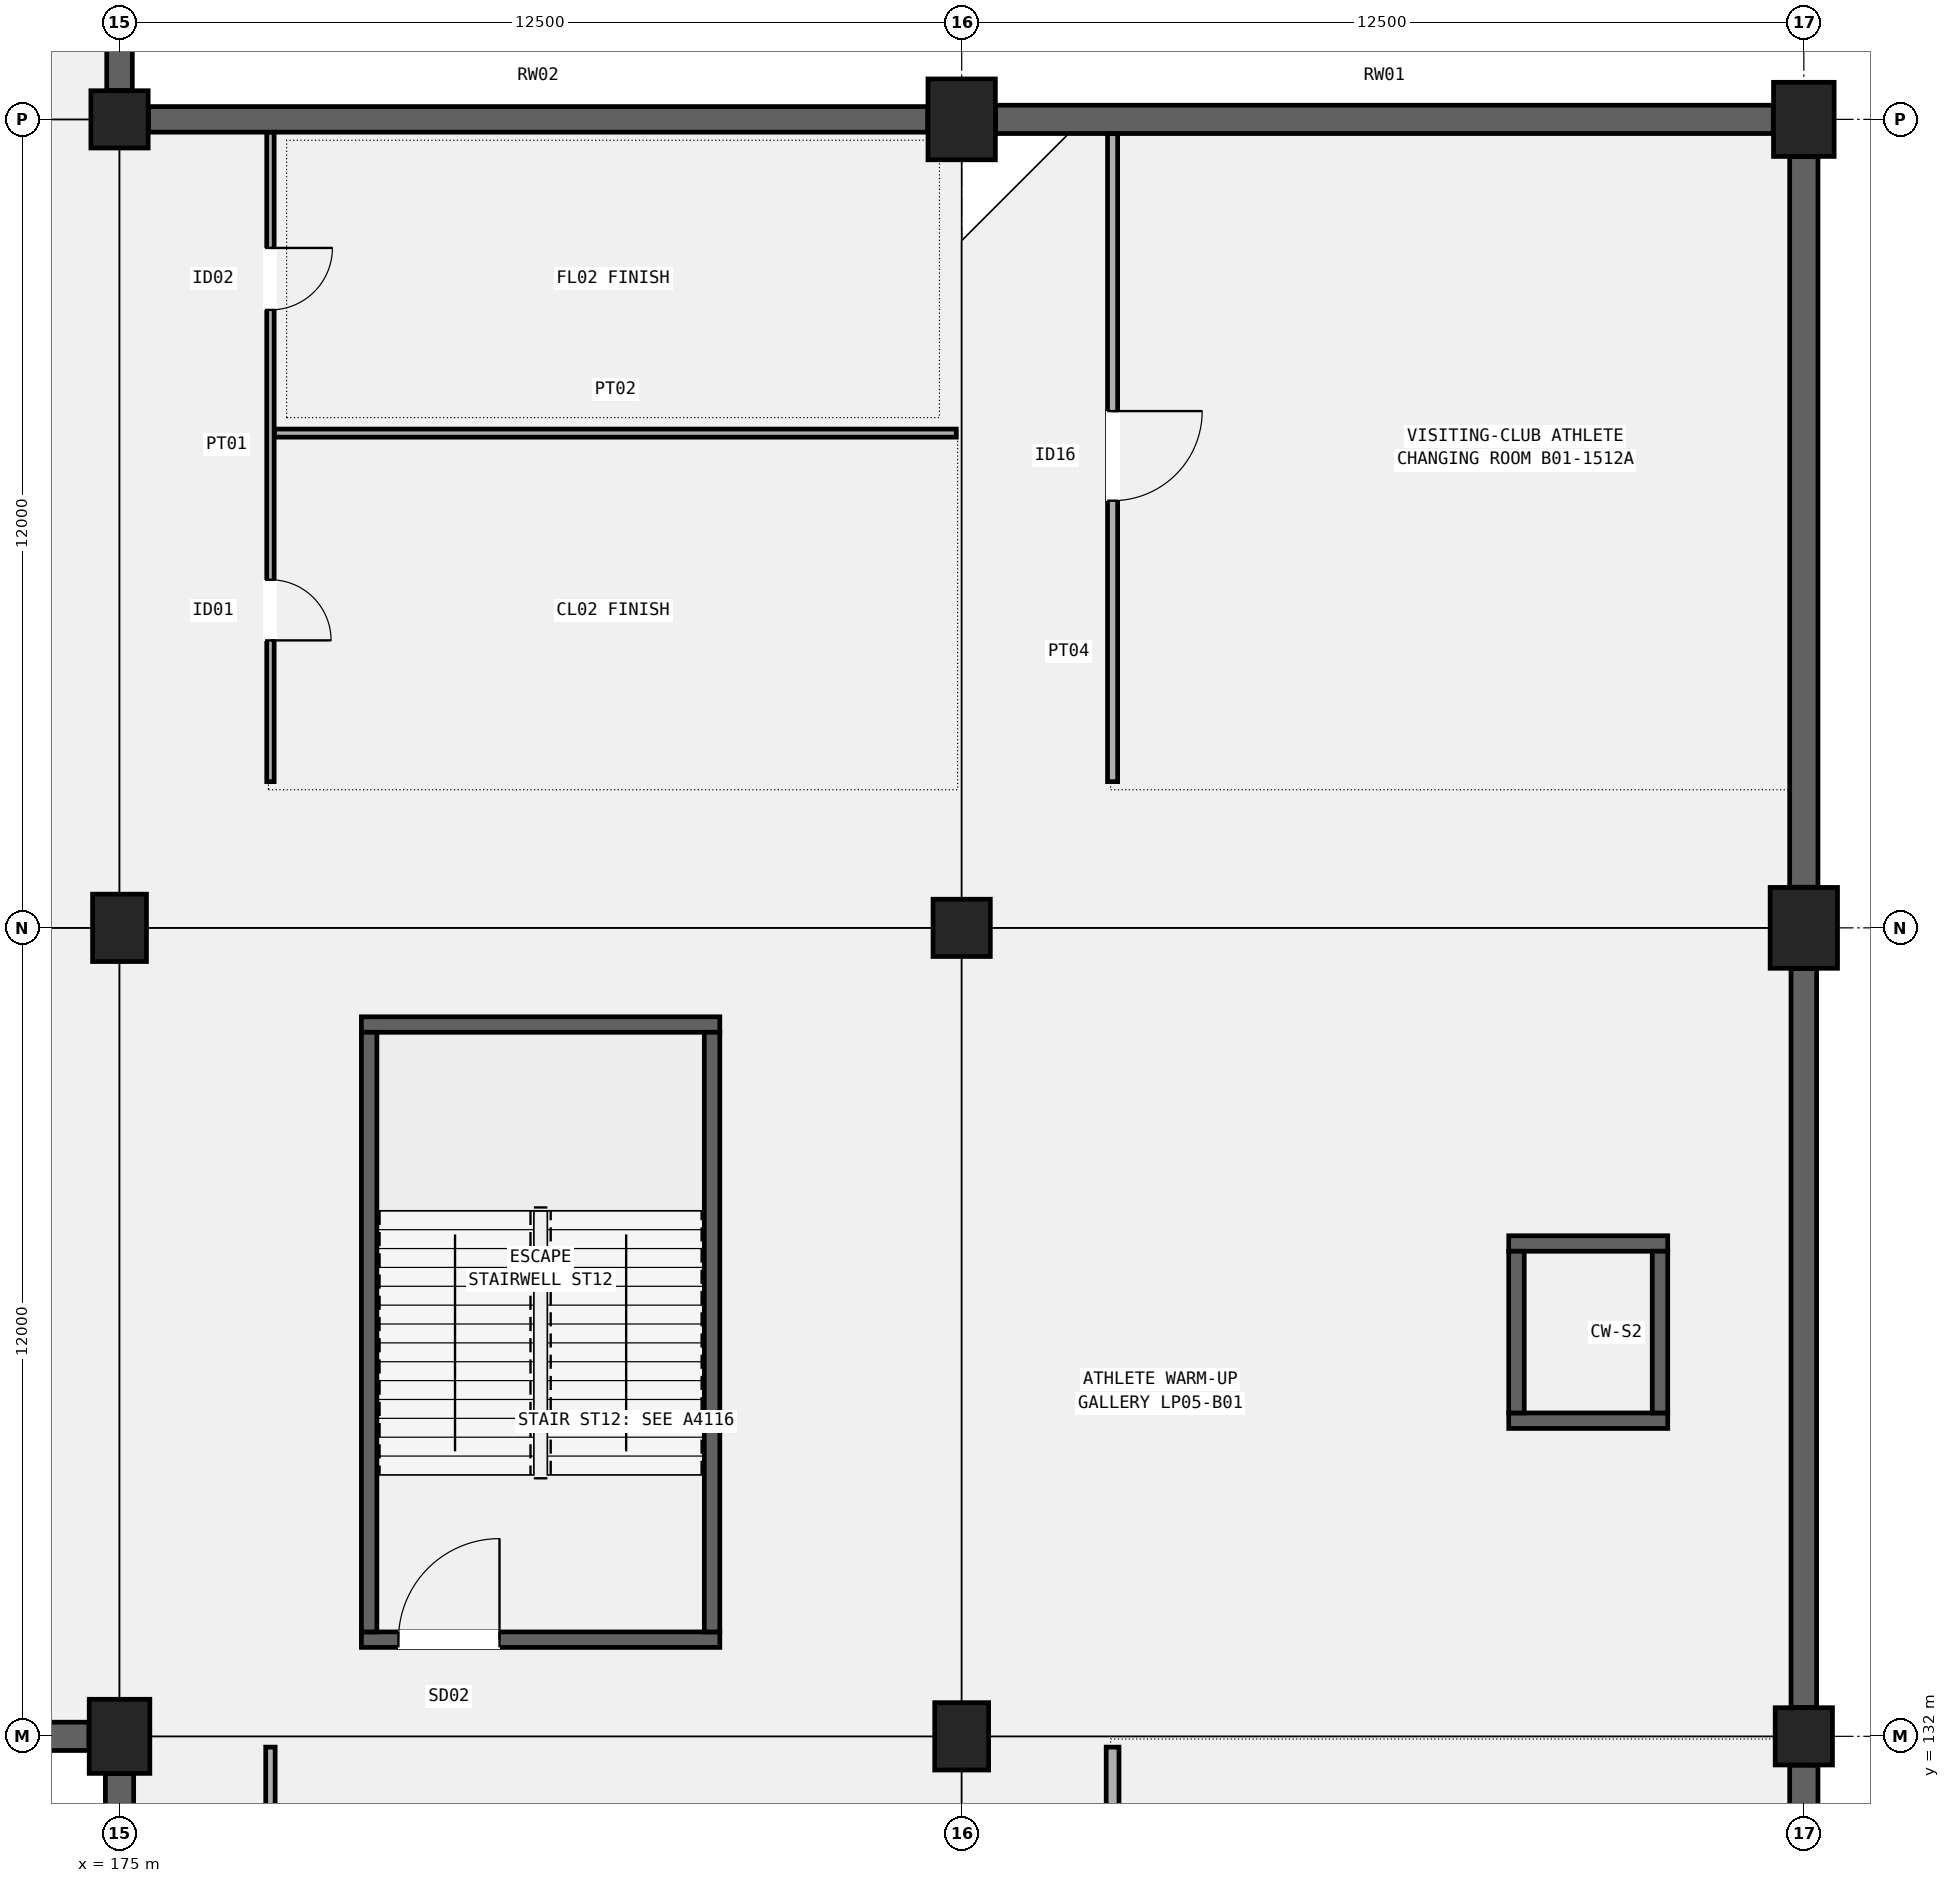
"""IFC4 building model, lengths in metres.
Left out: names, types, materials, properties, quantities, classifications, styles, units other than length and angle.
Written with IfcOpenShell. Run it as: python <this file> out.ifc"""

import sys

from ifc_helpers import new_model, si_unit, direction, frame, frame_2d, origin, origin_2d, place, context, subcontext, project, spatial, rectangle, circle, extrude, element, fill, save


model = new_model("IFC4")
c1 = context("Model", 3, precision=1e-05, world=origin(), true_north=direction((0.0, 1.0)))
c2 = subcontext(c1, "Body", "Model", "MODEL_VIEW")
j1 = project(units=[si_unit("LENGTHUNIT", "METRE"), si_unit("PLANEANGLEUNIT", "RADIAN")], contexts=[c1])
p1 = place(None, origin())
s1 = spatial("IfcSite", under=j1, at=p1, CompositionType="ELEMENT")
p2 = place(p1, origin())
s2 = spatial("IfcBuilding", under=s1, at=p2, CompositionType="ELEMENT")
p3 = place(p2, frame((0.0, 0.0, -4.8)))
s3 = spatial("IfcBuildingStorey", under=s2, at=p3, CompositionType="ELEMENT", Elevation=-4.8)
p4 = place(p3, frame((175.0, 132.0, 0.0), z_axis=(0.0, 0.0, 1.0), x_axis=(1.0, 0.0, 0.0)))
e1 = element("IfcColumn", 1, at=p4, inside=s3, PredefinedType="COLUMN", context=c2, shape_type="SweptSolid", body=[
    extrude(rectangle(XDim=0.9, YDim=1.1, at=origin_2d()), origin(), (0.0, 0.0, 1.0), 4.8),
])
p5 = place(p3, frame((175.0, 144.0, 0.0), z_axis=(0.0, 0.0, 1.0), x_axis=(1.0, 0.0, 0.0)))
e2 = element("IfcColumn", 2, at=p5, inside=s3, PredefinedType="COLUMN", context=c2, shape_type="SweptSolid", body=[
    extrude(rectangle(XDim=0.8, YDim=1.0, at=origin_2d()), origin(), (0.0, 0.0, 1.0), 4.8),
])
p6 = place(p3, frame((175.0, 156.0, 0.0), z_axis=(0.0, 0.0, 1.0), x_axis=(1.0, 0.0, 0.0)))
e3 = element("IfcColumn", 3, at=p6, inside=s3, PredefinedType="COLUMN", context=c2, shape_type="SweptSolid", body=[
    extrude(circle(Radius=0.425, at=origin_2d()), origin(), (0.0, 0.0, 1.0), 4.8),
])
p7 = place(p3, frame((187.5, 132.0, 0.0), z_axis=(0.0, 0.0, 1.0), x_axis=(1.0, 0.0, 0.0)))
e4 = element("IfcColumn", 4, at=p7, inside=s3, PredefinedType="COLUMN", context=c2, shape_type="SweptSolid", body=[
    extrude(rectangle(XDim=0.8, YDim=1.0, at=origin_2d()), origin(), (0.0, 0.0, 1.0), 4.8),
])
p8 = place(p3, frame((187.5, 144.0, 0.0), z_axis=(0.0, 0.0, 1.0), x_axis=(1.0, 0.0, 0.0)))
e5 = element("IfcColumn", 5, at=p8, inside=s3, PredefinedType="COLUMN", context=c2, shape_type="SweptSolid", body=[
    extrude(circle(Radius=0.425, at=origin_2d()), origin(), (0.0, 0.0, 1.0), 4.8),
])
p9 = place(p3, frame((187.5, 156.0, 0.0), z_axis=(0.0, 0.0, 1.0), x_axis=(1.0, 0.0, 0.0)))
e6 = element("IfcColumn", 6, at=p9, inside=s3, PredefinedType="COLUMN", context=c2, shape_type="SweptSolid", body=[
    extrude(rectangle(XDim=1.0, YDim=1.2, at=origin_2d()), origin(), (0.0, 0.0, 1.0), 4.8),
])
p10 = place(p3, frame((200.0, 132.0, 0.0), z_axis=(0.0, 0.0, 1.0), x_axis=(1.0, 0.0, 0.0)))
e7 = element("IfcColumn", 7, at=p10, inside=s3, PredefinedType="COLUMN", context=c2, shape_type="SweptSolid", body=[
    extrude(circle(Radius=0.425, at=origin_2d()), origin(), (0.0, 0.0, 1.0), 4.8),
])
p11 = place(p3, frame((200.0, 144.0, 0.0), z_axis=(0.0, 0.0, 1.0), x_axis=(1.0, 0.0, 0.0)))
e8 = element("IfcColumn", 8, at=p11, inside=s3, PredefinedType="COLUMN", context=c2, shape_type="SweptSolid", body=[
    extrude(rectangle(XDim=1.0, YDim=1.2, at=origin_2d()), origin(), (0.0, 0.0, 1.0), 4.8),
])
p12 = place(p3, frame((200.0, 156.0, 0.0), z_axis=(0.0, 0.0, 1.0), x_axis=(1.0, 0.0, 0.0)))
e9 = element("IfcColumn", 9, at=p12, inside=s3, PredefinedType="COLUMN", context=c2, shape_type="SweptSolid", body=[
    extrude(rectangle(XDim=0.9, YDim=1.1, at=origin_2d()), origin(), (0.0, 0.0, 1.0), 4.8),
])
p13 = place(p3, frame((163.004, 132.0, 0.0), z_axis=(0.0, 0.0, 1.0), x_axis=(1.0, 0.0, 0.0)))
e10 = element("IfcWall", 10, at=p13, inside=s3, PredefinedType="STANDARD", context=c2, shape_type="SweptSolid", body=[
    extrude(rectangle(XDim=11.542, YDim=0.42, at=frame_2d((5.771, 0.0))), origin(), (0.0, 0.0, 1.0), 4.46),
])
p14 = place(p3, frame((175.0, 156.429, 0.0), z_axis=(0.0, 0.0, 1.0), x_axis=(0.0, 1.0, 0.0)))
e11 = element("IfcWall", 11, at=p14, inside=s3, PredefinedType="STANDARD", context=c2, shape_type="SweptSolid", body=[
    extrude(rectangle(XDim=10.967, YDim=0.38, at=frame_2d((5.483, 0.0))), origin(), (0.0, 0.0, 1.0), 4.46),
])
p15 = place(p3, frame((175.0, 120.604, 0.0), z_axis=(0.0, 0.0, 1.0), x_axis=(0.0, 1.0, 0.0)))
e12 = element("IfcWall", 12, at=p15, inside=s3, PredefinedType="STANDARD", context=c2, shape_type="SweptSolid", body=[
    extrude(rectangle(XDim=10.842, YDim=0.42, at=frame_2d((5.421, 0.0))), origin(), (0.0, 0.0, 1.0), 4.46),
])
p16 = place(p3, frame((175.429, 156.0, 0.0), z_axis=(0.0, 0.0, 1.0), x_axis=(1.0, 0.0, 0.0)))
e13 = element("IfcWall", 13, at=p16, inside=s3, PredefinedType="STANDARD", context=c2, shape_type="SweptSolid", body=[
    extrude(rectangle(XDim=11.567, YDim=0.38, at=frame_2d((5.784, 0.0))), origin(), (0.0, 0.0, 1.0), 4.46),
])
p17 = place(p3, frame((200.0, 120.504, 0.0), z_axis=(0.0, 0.0, 1.0), x_axis=(0.0, 1.0, 0.0)))
e14 = element("IfcWall", 14, at=p17, inside=s3, PredefinedType="STANDARD", context=c2, shape_type="SweptSolid", body=[
    extrude(rectangle(XDim=11.067, YDim=0.42, at=frame_2d((5.534, 0.0))), origin(), (0.0, 0.0, 1.0), 4.46),
])
p18 = place(p3, frame((200.0, 132.429, 0.0), z_axis=(0.0, 0.0, 1.0), x_axis=(0.0, 1.0, 0.0)))
e15 = element("IfcWall", 15, at=p18, inside=s3, PredefinedType="STANDARD", context=c2, shape_type="SweptSolid", body=[
    extrude(rectangle(XDim=10.967, YDim=0.38, at=frame_2d((5.483, 0.0))), origin(), (0.0, 0.0, 1.0), 4.46),
])
p19 = place(p3, frame((188.004, 156.0, 0.0), z_axis=(0.0, 0.0, 1.0), x_axis=(1.0, 0.0, 0.0)))
e16 = element("IfcWall", 16, at=p19, inside=s3, PredefinedType="STANDARD", context=c2, shape_type="SweptSolid", body=[
    extrude(rectangle(XDim=11.542, YDim=0.42, at=frame_2d((5.771, 0.0))), origin(), (0.0, 0.0, 1.0), 4.46),
])
p20 = place(p3, frame((200.0, 144.604, 0.0), z_axis=(0.0, 0.0, 1.0), x_axis=(0.0, 1.0, 0.0)))
e17 = element("IfcWall", 17, at=p20, inside=s3, PredefinedType="STANDARD", context=c2, shape_type="SweptSolid", body=[
    extrude(rectangle(XDim=10.842, YDim=0.42, at=frame_2d((5.421, 0.0))), origin(), (0.0, 0.0, 1.0), 4.46),
])
p21 = place(p3, frame((178.59, 133.435, 0.0), z_axis=(0.0, 0.0, 1.0), x_axis=(1.0, 0.0, 0.0)))
e18 = element("IfcWall", 18, at=p21, inside=s3, PredefinedType="SHEAR", context=c2, shape_type="SweptSolid", body=[
    extrude(rectangle(XDim=5.32, YDim=0.23, at=frame_2d((2.66, 0.0))), origin(), (0.0, 0.0, 1.0), 4.5),
])
p22 = place(p21, frame((0.55, 0.0, 0.0)))
e19 = element("IfcOpeningElement", 19, at=p22, cuts=e18, PredefinedType="OPENING", context=c2, shape_type="SweptSolid", body=[
    extrude(rectangle(XDim=1.5, YDim=2.2, at=frame_2d((0.75, 1.1))), frame((0.0, 0.125, 0.0), z_axis=(0.0, -1.0, 0.0), x_axis=(1.0, 0.0, 0.0)), (0.0, 0.0, 1.0), 0.25),
])
p23 = place(p3, frame((178.59, 142.565, 0.0), z_axis=(0.0, 0.0, 1.0), x_axis=(1.0, 0.0, 0.0)))
e20 = element("IfcWall", 20, at=p23, inside=s3, PredefinedType="SHEAR", context=c2, shape_type="SweptSolid", body=[
    extrude(rectangle(XDim=5.32, YDim=0.23, at=frame_2d((2.66, 0.0))), origin(), (0.0, 0.0, 1.0), 4.5),
])
for number, where, z_axis, x_axis in (
    (21, (178.705, 133.55, 0.0), (0.0, 0.0, 1.0), (0.0, 1.0, 0.0)),
    (22, (183.795, 133.55, 0.0), (0.0, 0.0, 1.0), (0.0, 1.0, 0.0)),
):
    element("IfcWall", number, at=place(p3, frame(where, z_axis=z_axis, x_axis=x_axis)), inside=s3, PredefinedType="SHEAR", context=c2, shape_type="SweptSolid", body=[
        extrude(rectangle(XDim=8.9, YDim=0.23, at=frame_2d((4.45, 0.0))), origin(), (0.0, 0.0, 1.0), 4.5),
    ])
for number, where, z_axis, x_axis in (
    (23, (195.62, 136.685, -0.65), (0.0, 0.0, 1.0), (1.0, 0.0, 0.0)),
    (24, (195.62, 139.315, -0.65), (0.0, 0.0, 1.0), (1.0, 0.0, 0.0)),
):
    element("IfcWall", number, at=place(p3, frame(where, z_axis=z_axis, x_axis=x_axis)), inside=s3, PredefinedType="SHEAR", context=c2, shape_type="SweptSolid", body=[
        extrude(rectangle(XDim=2.36, YDim=0.23, at=frame_2d((1.18, 0.0))), origin(), (0.0, 0.0, 1.0), 4.5),
    ])
for number, where, z_axis, x_axis in (
    (25, (195.735, 136.8, -0.65), (0.0, 0.0, 1.0), (0.0, 1.0, 0.0)),
    (26, (197.865, 136.8, -0.65), (0.0, 0.0, 1.0), (0.0, 1.0, 0.0)),
):
    element("IfcWall", number, at=place(p3, frame(where, z_axis=z_axis, x_axis=x_axis)), inside=s3, PredefinedType="SHEAR", context=c2, shape_type="SweptSolid", body=[
        extrude(rectangle(XDim=2.4, YDim=0.23, at=frame_2d((1.2, 0.0))), origin(), (0.0, 0.0, 1.0), 4.5),
    ])
p24 = place(p3, frame((177.24, 120.16, 0.0), z_axis=(0.0, 0.0, 1.0), x_axis=(0.0, 1.0, 0.0)))
e27 = element("IfcWall", 27, at=p24, inside=s3, PredefinedType="PARTITIONING", context=c2, shape_type="SweptSolid", body=[
    extrude(rectangle(XDim=11.68, YDim=0.14, at=frame_2d((5.84, 0.0))), origin(), (0.0, 0.0, 1.0), 3.92),
])
p25 = place(p24, frame((2.772, 0.0, 0.0), z_axis=(0.0, 0.0, 1.0), x_axis=(-1.0, 0.0, 0.0)))
e28 = element("IfcOpeningElement", 28, at=p25, cuts=e27, PredefinedType="OPENING", context=c2, shape_type="SweptSolid", body=[
    extrude(rectangle(XDim=1.7, YDim=2.32, at=frame_2d((0.85, 1.16))), frame((0.0, 0.08, 0.0), z_axis=(0.0, -1.0, 0.0), x_axis=(1.0, 0.0, 0.0)), (0.0, 0.0, 1.0), 0.16),
])
p26 = place(p24, frame((8.722, 0.0, 0.0), z_axis=(0.0, 0.0, 1.0), x_axis=(-1.0, 0.0, 0.0)))
e29 = element("IfcOpeningElement", 29, at=p26, cuts=e27, PredefinedType="OPENING", context=c2, shape_type="SweptSolid", body=[
    extrude(rectangle(XDim=1.76, YDim=2.3, at=frame_2d((0.88, 1.15))), frame((0.0, 0.08, 0.0), z_axis=(0.0, -1.0, 0.0), x_axis=(1.0, 0.0, 0.0)), (0.0, 0.0, 1.0), 0.16),
])
p27 = place(p3, frame((177.24, 146.17, 0.0), z_axis=(0.0, 0.0, 1.0), x_axis=(0.0, 1.0, 0.0)))
e30 = element("IfcWall", 30, at=p27, inside=s3, PredefinedType="PARTITIONING", context=c2, shape_type="SweptSolid", body=[
    extrude(rectangle(XDim=9.638, YDim=0.11, at=frame_2d((4.819, 0.0))), origin(), (0.0, 0.0, 1.0), 3.92),
])
p28 = place(p27, frame((2.997, 0.0, 0.0), z_axis=(0.0, 0.0, 1.0), x_axis=(-1.0, 0.0, 0.0)))
e31 = element("IfcOpeningElement", 31, at=p28, cuts=e30, PredefinedType="OPENING", context=c2, shape_type="SweptSolid", body=[
    extrude(rectangle(XDim=0.9, YDim=2.06, at=frame_2d((0.45, 1.03))), frame((0.0, 0.065, 0.0), z_axis=(0.0, -1.0, 0.0), x_axis=(1.0, 0.0, 0.0)), (0.0, 0.0, 1.0), 0.13),
])
p29 = place(p27, frame((7.922, 0.0, 0.0), z_axis=(0.0, 0.0, 1.0), x_axis=(-1.0, 0.0, 0.0)))
e32 = element("IfcOpeningElement", 32, at=p29, cuts=e30, PredefinedType="OPENING", context=c2, shape_type="SweptSolid", body=[
    extrude(rectangle(XDim=0.92, YDim=2.1, at=frame_2d((0.46, 1.05))), frame((0.0, 0.065, 0.0), z_axis=(0.0, -1.0, 0.0), x_axis=(1.0, 0.0, 0.0)), (0.0, 0.0, 1.0), 0.13),
])
p30 = place(p3, frame((177.3, 151.344, 0.0), z_axis=(0.0, 0.0, 1.0), x_axis=(1.0, 0.0, 0.0)))
e33 = element("IfcWall", 33, at=p30, inside=s3, PredefinedType="PARTITIONING", context=c2, shape_type="SweptSolid", body=[
    extrude(rectangle(XDim=10.12, YDim=0.12, at=frame_2d((5.06, 0.0))), origin(), (0.0, 0.0, 1.0), 3.92),
])
p31 = place(p3, frame((189.74, 120.16, 0.0), z_axis=(0.0, 0.0, 1.0), x_axis=(0.0, 1.0, 0.0)))
e34 = element("IfcWall", 34, at=p31, inside=s3, PredefinedType="PARTITIONING", context=c2, shape_type="SweptSolid", body=[
    extrude(rectangle(XDim=11.68, YDim=0.19, at=frame_2d((5.84, 0.0))), origin(), (0.0, 0.0, 1.0), 3.92),
])
p32 = place(p31, frame((2.452, 0.0, 0.0), z_axis=(0.0, 0.0, 1.0), x_axis=(-1.0, 0.0, 0.0)))
e35 = element("IfcOpeningElement", 35, at=p32, cuts=e34, PredefinedType="OPENING", context=c2, shape_type="SweptSolid", body=[
    extrude(rectangle(XDim=1.27, YDim=2.2, at=frame_2d((0.635, 1.1))), frame((0.0, 0.105, 0.0), z_axis=(0.0, -1.0, 0.0), x_axis=(1.0, 0.0, 0.0)), (0.0, 0.0, 1.0), 0.21),
])
p33 = place(p31, frame((8.387, 0.0, 0.0), z_axis=(0.0, 0.0, 1.0), x_axis=(-1.0, 0.0, 0.0)))
e36 = element("IfcOpeningElement", 36, at=p33, cuts=e34, PredefinedType="OPENING", context=c2, shape_type="SweptSolid", body=[
    extrude(rectangle(XDim=1.3, YDim=2.24, at=frame_2d((0.65, 1.12))), frame((0.0, 0.105, 0.0), z_axis=(0.0, -1.0, 0.0), x_axis=(1.0, 0.0, 0.0)), (0.0, 0.0, 1.0), 0.21),
])
p34 = place(p3, frame((189.74, 146.17, 0.0), z_axis=(0.0, 0.0, 1.0), x_axis=(0.0, 1.0, 0.0)))
e37 = element("IfcWall", 37, at=p34, inside=s3, PredefinedType="PARTITIONING", context=c2, shape_type="SweptSolid", body=[
    extrude(rectangle(XDim=9.618, YDim=0.15, at=frame_2d((4.809, 0.0))), origin(), (0.0, 0.0, 1.0), 3.92),
])
p35 = place(p34, frame((5.5, 0.0, 0.0), z_axis=(0.0, 0.0, 1.0), x_axis=(-1.0, 0.0, 0.0)))
e38 = element("IfcOpeningElement", 38, at=p35, cuts=e37, PredefinedType="OPENING", context=c2, shape_type="SweptSolid", body=[
    extrude(rectangle(XDim=1.33, YDim=2.22, at=frame_2d((0.665, 1.11))), frame((0.0, 0.085, 0.0), z_axis=(0.0, -1.0, 0.0), x_axis=(1.0, 0.0, 0.0)), (0.0, 0.0, 1.0), 0.17),
])
p36 = place(p22, origin())
e39 = element("IfcDoor", 39, at=p36, inside=s3, OperationType="SINGLE_SWING_RIGHT", PredefinedType="DOOR", context=c2, shape_type="SweptSolid", body=[
    extrude(rectangle(XDim=1.5, YDim=2.2, at=frame_2d((0.75, 1.1))), frame((0.0, 0.025, 0.0), z_axis=(0.0, -1.0, 0.0), x_axis=(1.0, 0.0, 0.0)), (0.0, 0.0, 1.0), 0.05),
])
fill(e19, e39)
p37 = place(p28, origin())
e40 = element("IfcDoor", 40, at=p37, inside=s3, OperationType="SINGLE_SWING_RIGHT", PredefinedType="DOOR", context=c2, shape_type="SweptSolid", body=[
    extrude(rectangle(XDim=0.9, YDim=2.06, at=frame_2d((0.45, 1.03))), frame((0.0, 0.025, 0.0), z_axis=(0.0, -1.0, 0.0), x_axis=(1.0, 0.0, 0.0)), (0.0, 0.0, 1.0), 0.05),
])
fill(e31, e40)
p38 = place(p29, origin())
e41 = element("IfcDoor", 41, at=p38, inside=s3, OperationType="SINGLE_SWING_LEFT", PredefinedType="DOOR", context=c2, shape_type="SweptSolid", body=[
    extrude(rectangle(XDim=0.92, YDim=2.1, at=frame_2d((0.46, 1.05))), frame((0.0, 0.025, 0.0), z_axis=(0.0, -1.0, 0.0), x_axis=(1.0, 0.0, 0.0)), (0.0, 0.0, 1.0), 0.05),
])
fill(e32, e41)
p39 = place(p35, origin())
e42 = element("IfcDoor", 42, at=p39, inside=s3, OperationType="SINGLE_SWING_LEFT", PredefinedType="DOOR", context=c2, shape_type="SweptSolid", body=[
    extrude(rectangle(XDim=1.33, YDim=2.22, at=frame_2d((0.665, 1.11))), frame((0.0, 0.025, 0.0), z_axis=(0.0, -1.0, 0.0), x_axis=(1.0, 0.0, 0.0)), (0.0, 0.0, 1.0), 0.05),
])
fill(e38, e42)
save(model, sys.argv[1])
